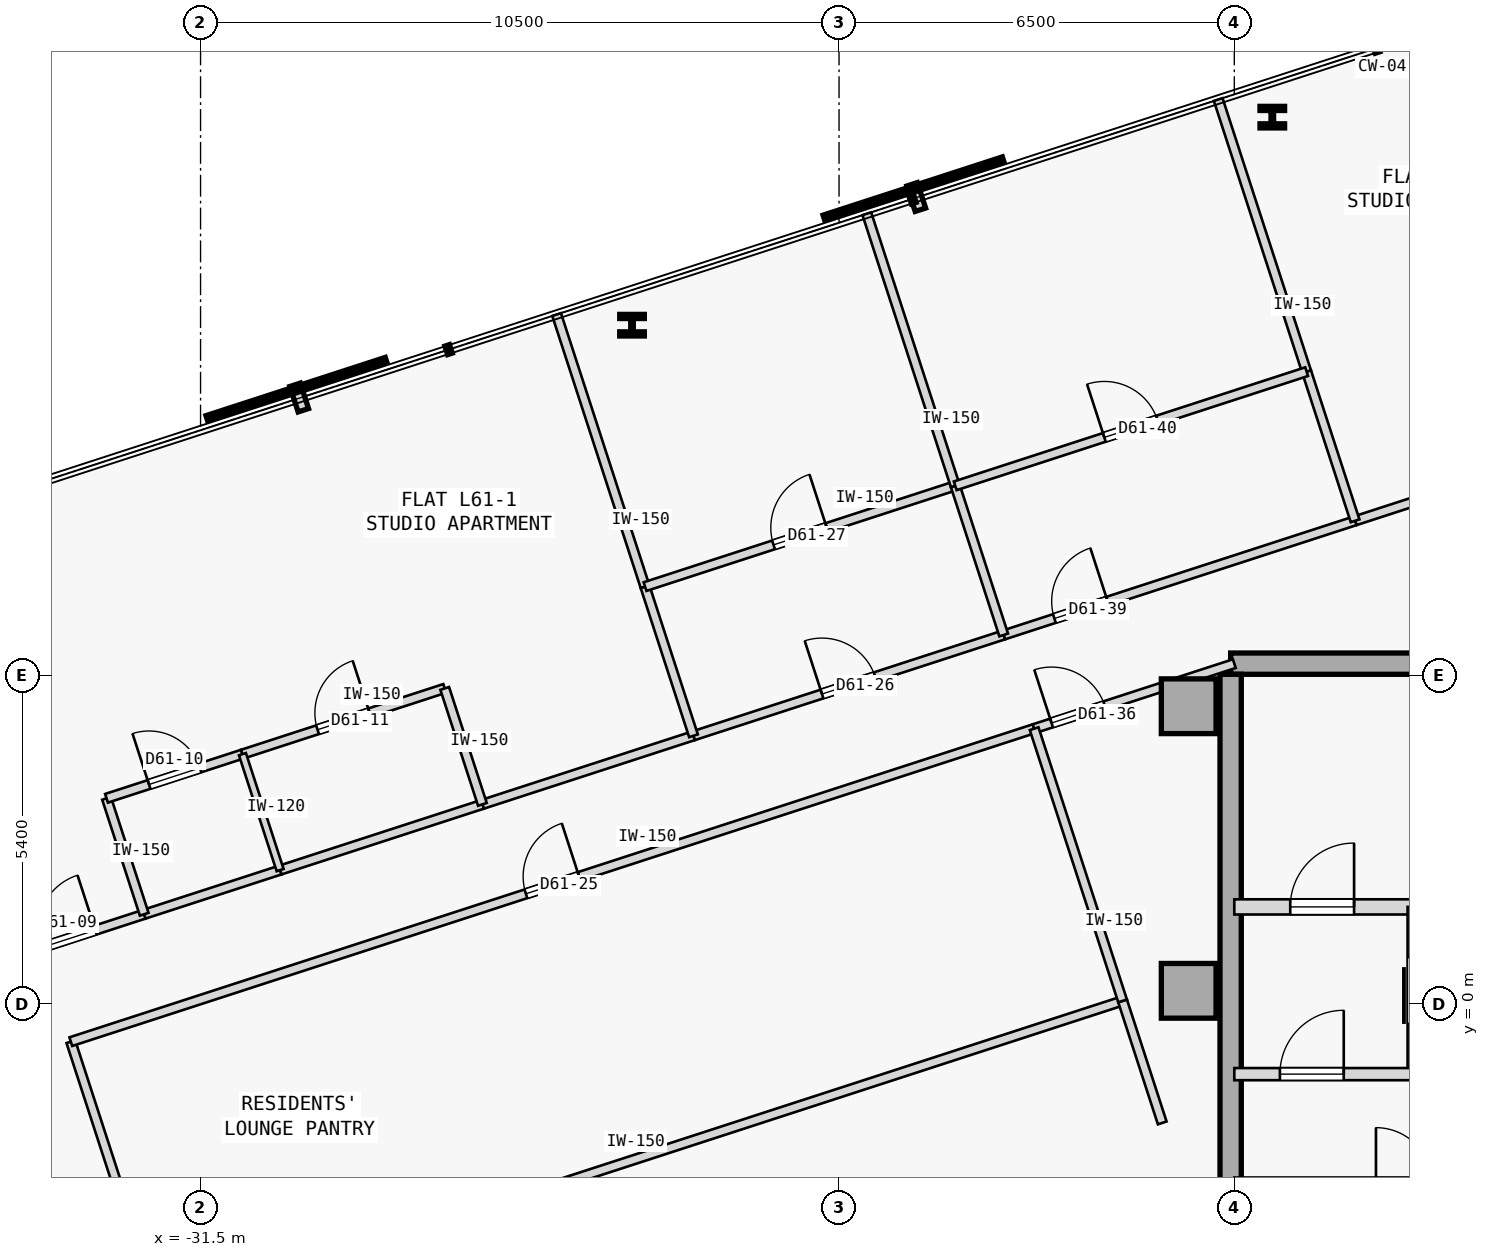
"""IFC4 building model, lengths in metres.
Left out: names, types, materials, properties, quantities, classifications, styles, units other than length and angle.
Written with IfcOpenShell. Run it as: python <this file> out.ifc"""

import sys

from ifc_helpers import new_model, si_unit, direction, frame, frame_2d, origin, origin_2d, place, context, subcontext, project, spatial, rectangle, i_section, extrude, element, fill, save


model = new_model("IFC4")
c1 = context("Model", 3, precision=1e-05, world=origin(), true_north=direction((0.0, 1.0)))
c2 = subcontext(c1, "Body", "Model", "MODEL_VIEW")
j1 = project(units=[si_unit("LENGTHUNIT", "METRE"), si_unit("PLANEANGLEUNIT", "RADIAN")], contexts=[c1])
p1 = place(None, origin())
s1 = spatial("IfcSite", under=j1, at=p1, CompositionType="ELEMENT")
p2 = place(p1, origin())
s2 = spatial("IfcBuilding", under=s1, at=p2, CompositionType="ELEMENT")
p3 = place(p2, frame((0.0, 0.0, 231.0)))
s3 = spatial("IfcBuildingStorey", under=s2, at=p3, CompositionType="ELEMENT", Elevation=231.0)
for number, where, z_axis, x_axis in (
    (1, (-15.25, 4.9, 0.0), (0.0, 0.0, 1.0), (1.0, 0.0, 0.0)),
    (2, (-15.25, 0.22, 0.0), (0.0, 0.0, 1.0), (1.0, 0.0, 0.0)),
):
    element("IfcColumn", number, at=place(p3, frame(where, z_axis=z_axis, x_axis=x_axis)), inside=s3, PredefinedType="COLUMN", context=c2, shape_type="SweptSolid", body=[
        extrude(rectangle(XDim=0.9, YDim=0.9, at=origin_2d()), origin(), (0.0, 0.0, 1.0), 3.35),
    ])
p4 = place(p3, frame((-14.56, 5.6, 0.0), z_axis=(0.0, 0.0, 1.0), x_axis=(1.0, 0.0, 0.0)))
e3 = element("IfcWall", 3, at=p4, inside=s3, PredefinedType="SHEAR", context=c2, shape_type="SweptSolid", body=[
    extrude(rectangle(XDim=11.41, YDim=0.35, at=frame_2d((5.705, 0.0))), origin(), (0.0, 0.0, 1.0), 3.125),
])
p5 = place(p3, frame((-14.56, -5.425, 0.0), z_axis=(0.0, 0.0, 1.0), x_axis=(0.0, 1.0, 0.0)))
e4 = element("IfcWall", 4, at=p5, inside=s3, PredefinedType="SHEAR", context=c2, shape_type="SweptSolid", body=[
    extrude(rectangle(XDim=10.85, YDim=0.35, at=frame_2d((5.425, 0.0))), origin(), (0.0, 0.0, 1.0), 3.125),
])
for number, where, z_axis, x_axis in (
    (5, (-13.875, 14.587, 0.0), (0.0, 0.0, 1.0), (1.0, 0.0, 0.0)),
    (6, (-24.404, 11.166, 0.0), (0.0, 0.0, 1.0), (1.0, 0.0, 0.0)),
):
    element("IfcColumn", number, at=place(p3, frame(where, z_axis=z_axis, x_axis=x_axis)), inside=s3, PredefinedType="COLUMN", context=c2, shape_type="SweptSolid", body=[
        extrude(i_section(OverallWidth=0.405, OverallDepth=0.355, WebThickness=0.042, FlangeThickness=0.068, FilletRadius=0.015, at=origin_2d()), origin(), (0.0, 0.0, 1.0), 3.35),
    ])
p6 = place(p3, frame((-14.5, 1.6, 0.0), z_axis=(0.0, 0.0, 1.0), x_axis=(1.0, 0.0, 0.0)))
e7 = element("IfcWall", 7, at=p6, inside=s3, PredefinedType="STANDARD", context=c2, shape_type="SweptSolid", body=[
    extrude(rectangle(XDim=3.6, YDim=0.25, at=frame_2d((1.8, 0.0))), origin(), (0.0, 0.0, 1.0), 3.125),
])
p7 = place(p6, frame((0.92, 0.0, 0.0)))
e8 = element("IfcOpeningElement", 8, at=p7, cuts=e7, PredefinedType="OPENING", context=c2, shape_type="SweptSolid", body=[
    extrude(rectangle(XDim=1.05, YDim=2.15, at=frame_2d((0.525, 1.075))), frame((0.0, 0.135, 0.0), z_axis=(0.0, -1.0, 0.0), x_axis=(1.0, 0.0, 0.0)), (0.0, 0.0, 1.0), 0.27),
])
p8 = place(p3, frame((-11.55, -1.15, 0.0), z_axis=(0.0, 0.0, 1.0), x_axis=(0.0, 1.0, 0.0)))
e9 = element("IfcWall", 9, at=p8, inside=s3, PredefinedType="STANDARD", context=c2, shape_type="SweptSolid", body=[
    extrude(rectangle(XDim=2.75, YDim=0.2, at=frame_2d((1.375, 0.0))), origin(), (0.0, 0.0, 1.0), 3.125),
])
p9 = place(p8, frame((0.825, 0.0, 0.0)))
e10 = element("IfcOpeningElement", 10, at=p9, cuts=e9, PredefinedType="OPENING", context=c2, shape_type="SweptSolid", body=[
    extrude(rectangle(XDim=1.1, YDim=2.15, at=frame_2d((0.55, 1.075))), frame((0.0, 0.11, 0.0), z_axis=(0.0, -1.0, 0.0), x_axis=(1.0, 0.0, 0.0)), (0.0, 0.0, 1.0), 0.22),
])
p10 = place(p3, frame((-14.5, -1.15, 0.0), z_axis=(0.0, 0.0, 1.0), x_axis=(1.0, 0.0, 0.0)))
e11 = element("IfcWall", 11, at=p10, inside=s3, PredefinedType="STANDARD", context=c2, shape_type="SweptSolid", body=[
    extrude(rectangle(XDim=2.95, YDim=0.2, at=frame_2d((1.475, 0.0))), origin(), (0.0, 0.0, 1.0), 3.125),
])
p11 = place(p10, frame((0.75, 0.0, 0.0)))
e12 = element("IfcOpeningElement", 12, at=p11, cuts=e11, PredefinedType="OPENING", context=c2, shape_type="SweptSolid", body=[
    extrude(rectangle(XDim=1.05, YDim=2.18, at=frame_2d((0.525, 1.09))), frame((0.0, 0.11, 0.0), z_axis=(0.0, -1.0, 0.0), x_axis=(1.0, 0.0, 0.0)), (0.0, 0.0, 1.0), 0.22),
])
p12 = place(p3, frame((-36.012, 0.314, 0.0), z_axis=(0.0, 0.0, 1.0), x_axis=(0.951071182868, 0.308971851659, 0.0)))
e13 = element("IfcWall", 13, at=p12, inside=s3, PredefinedType="PARTITIONING", context=c2, shape_type="SweptSolid", body=[
    extrude(rectangle(XDim=3.77, YDim=0.15, at=frame_2d((1.885, 0.0))), origin(), (0.0, 0.0, 1.0), 3.125),
])
p13 = place(p12, frame((1.976, 0.0, 0.0)))
e14 = element("IfcOpeningElement", 14, at=p13, cuts=e13, PredefinedType="OPENING", context=c2, shape_type="SweptSolid", body=[
    extrude(rectangle(XDim=0.95, YDim=2.15, at=frame_2d((0.475, 1.075))), frame((0.0, 0.085, 0.0), z_axis=(0.0, -1.0, 0.0), x_axis=(1.0, 0.0, 0.0)), (0.0, 0.0, 1.0), 0.17),
])
p14 = place(p3, frame((-26.865, 3.286, 0.0), z_axis=(0.0, 0.0, 1.0), x_axis=(0.951057168147, 0.309014988174, 0.0)))
e15 = element("IfcWall", 15, at=p14, inside=s3, PredefinedType="PARTITIONING", context=c2, shape_type="SweptSolid", body=[
    extrude(rectangle(XDim=3.65, YDim=0.15, at=frame_2d((1.825, 0.0))), origin(), (0.0, 0.0, 1.0), 3.125),
])
p15 = place(p3, frame((-32.427, 1.479, 0.0), z_axis=(0.0, 0.0, 1.0), x_axis=(0.951045519245, 0.309050837767, 0.0)))
e16 = element("IfcWall", 16, at=p15, inside=s3, PredefinedType="PARTITIONING", context=c2, shape_type="SweptSolid", body=[
    extrude(rectangle(XDim=2.35, YDim=0.15, at=frame_2d((1.175, 0.0))), origin(), (0.0, 0.0, 1.0), 3.125),
])
p16 = place(p3, frame((-30.192, 2.205, 0.0), z_axis=(0.0, 0.0, 1.0), x_axis=(0.951063814176, 0.308994532905, 0.0)))
e17 = element("IfcWall", 17, at=p16, inside=s3, PredefinedType="PARTITIONING", context=c2, shape_type="SweptSolid", body=[
    extrude(rectangle(XDim=3.498, YDim=0.15, at=frame_2d((1.749, 0.0))), origin(), (0.0, 0.0, 1.0), 3.125),
])
p17 = place(p3, frame((-12.513, 7.949, 0.0), z_axis=(0.0, 0.0, 1.0), x_axis=(0.951050780541, 0.309034646652, 0.0)))
e18 = element("IfcWall", 18, at=p17, inside=s3, PredefinedType="PARTITIONING", context=c2, shape_type="SweptSolid", body=[
    extrude(rectangle(XDim=3.65, YDim=0.15, at=frame_2d((1.825, 0.0))), origin(), (0.0, 0.0, 1.0), 3.125),
])
p18 = place(p3, frame((-32.179, -5.093, 0.0), z_axis=(0.0, 0.0, 1.0), x_axis=(-0.309014532869, 0.951057316083, 0.0)))
e19 = element("IfcWall", 19, at=p18, inside=s3, PredefinedType="PARTITIONING", context=c2, shape_type="SweptSolid", body=[
    extrude(rectangle(XDim=4.707, YDim=0.15, at=frame_2d((2.354, 0.0))), origin(), (0.0, 0.0, 1.0), 3.125),
])
p19 = place(p3, frame((-33.633, -0.616, 0.0), z_axis=(0.0, 0.0, 1.0), x_axis=(0.951058192995, 0.309011833974, 0.0)))
e20 = element("IfcWall", 20, at=p19, inside=s3, PredefinedType="PARTITIONING", context=c2, shape_type="SweptSolid", body=[
    extrude(rectangle(XDim=16.657, YDim=0.15, at=frame_2d((8.329, 0.0))), origin(), (0.0, 0.0, 1.0), 3.125),
])
p20 = place(p19, frame((7.868, 0.0, 0.0)))
e21 = element("IfcOpeningElement", 21, at=p20, cuts=e20, PredefinedType="OPENING", context=c2, shape_type="SweptSolid", body=[
    extrude(rectangle(XDim=0.92, YDim=2.15, at=frame_2d((0.46, 1.075))), frame((0.0, 0.085, 0.0), z_axis=(0.0, -1.0, 0.0), x_axis=(1.0, 0.0, 0.0)), (0.0, 0.0, 1.0), 0.17),
])
p21 = place(p3, frame((-23.394, 4.414, 0.0), z_axis=(0.0, 0.0, 1.0), x_axis=(0.951050121956, 0.309036673434, 0.0)))
e22 = element("IfcWall", 22, at=p21, inside=s3, PredefinedType="PARTITIONING", context=c2, shape_type="SweptSolid", body=[
    extrude(rectangle(XDim=5.364, YDim=0.15, at=frame_2d((2.682, 0.0))), origin(), (0.0, 0.0, 1.0), 3.125),
])
p22 = place(p21, frame((2.222, 0.0, 0.0)))
e23 = element("IfcOpeningElement", 23, at=p22, cuts=e22, PredefinedType="OPENING", context=c2, shape_type="SweptSolid", body=[
    extrude(rectangle(XDim=0.92, YDim=2.15, at=frame_2d((0.46, 1.075))), frame((0.0, 0.085, 0.0), z_axis=(0.0, -1.0, 0.0), x_axis=(1.0, 0.0, 0.0)), (0.0, 0.0, 1.0), 0.17),
])
p23 = place(p3, frame((-17.792, 4.531, 0.0), z_axis=(0.0, 0.0, 1.0), x_axis=(0.951047546178, 0.309044600193, 0.0)))
e24 = element("IfcWall", 24, at=p23, inside=s3, PredefinedType="PARTITIONING", context=c2, shape_type="SweptSolid", body=[
    extrude(rectangle(XDim=3.461, YDim=0.15, at=frame_2d((1.73, 0.0))), origin(), (0.0, 0.0, 1.0), 3.125),
])
p24 = place(p23, frame((0.302, 0.0, 0.0)))
e25 = element("IfcOpeningElement", 25, at=p24, cuts=e24, PredefinedType="OPENING", context=c2, shape_type="SweptSolid", body=[
    extrude(rectangle(XDim=0.92, YDim=2.15, at=frame_2d((0.46, 1.075))), frame((0.0, 0.085, 0.0), z_axis=(0.0, -1.0, 0.0), x_axis=(1.0, 0.0, 0.0)), (0.0, 0.0, 1.0), 0.17),
])
p25 = place(p3, frame((-18.292, 6.072, 0.0), z_axis=(0.0, 0.0, 1.0), x_axis=(0.951062707515, 0.30899793911, 0.0)))
e26 = element("IfcWall", 26, at=p25, inside=s3, PredefinedType="PARTITIONING", context=c2, shape_type="SweptSolid", body=[
    extrude(rectangle(XDim=6.076, YDim=0.15, at=frame_2d((3.038, 0.0))), origin(), (0.0, 0.0, 1.0), 3.125),
])
p26 = place(p25, frame((0.877, 0.0, 0.0)))
e27 = element("IfcOpeningElement", 27, at=p26, cuts=e26, PredefinedType="OPENING", context=c2, shape_type="SweptSolid", body=[
    extrude(rectangle(XDim=0.92, YDim=2.15, at=frame_2d((0.46, 1.075))), frame((0.0, 0.085, 0.0), z_axis=(0.0, -1.0, 0.0), x_axis=(1.0, 0.0, 0.0)), (0.0, 0.0, 1.0), 0.17),
])
p27 = place(p3, frame((-32.427, 1.479, 0.0), z_axis=(0.0, 0.0, 1.0), x_axis=(-0.309022749039, 0.951054646472, 0.0)))
e28 = element("IfcWall", 28, at=p27, inside=s3, PredefinedType="PARTITIONING", context=c2, shape_type="SweptSolid", body=[
    extrude(rectangle(XDim=2.005, YDim=0.15, at=frame_2d((1.002, 0.0))), origin(), (0.0, 0.0, 1.0), 3.125),
])
p28 = place(p3, frame((-33.046, 3.386, 0.0), z_axis=(0.0, 0.0, 1.0), x_axis=(0.951045519245, 0.309050837767, 0.0)))
e29 = element("IfcWall", 29, at=p28, inside=s3, PredefinedType="PARTITIONING", context=c2, shape_type="SweptSolid", body=[
    extrude(rectangle(XDim=2.35, YDim=0.15, at=frame_2d((1.175, 0.0))), origin(), (0.0, 0.0, 1.0), 3.125),
])
p29 = place(p28, frame((0.735, 0.0, 0.0)))
e30 = element("IfcOpeningElement", 30, at=p29, cuts=e29, PredefinedType="OPENING", context=c2, shape_type="SweptSolid", body=[
    extrude(rectangle(XDim=0.88, YDim=2.15, at=frame_2d((0.44, 1.075))), frame((0.0, 0.085, 0.0), z_axis=(0.0, -1.0, 0.0), x_axis=(1.0, 0.0, 0.0)), (0.0, 0.0, 1.0), 0.17),
])
p30 = place(p3, frame((-30.811, 4.112, 0.0), z_axis=(0.0, 0.0, 1.0), x_axis=(0.951063814176, 0.308994532905, 0.0)))
e31 = element("IfcWall", 31, at=p30, inside=s3, PredefinedType="PARTITIONING", context=c2, shape_type="SweptSolid", body=[
    extrude(rectangle(XDim=3.498, YDim=0.15, at=frame_2d((1.749, 0.0))), origin(), (0.0, 0.0, 1.0), 3.125),
])
p31 = place(p30, frame((1.299, 0.0, 0.0)))
e32 = element("IfcOpeningElement", 32, at=p31, cuts=e31, PredefinedType="OPENING", context=c2, shape_type="SweptSolid", body=[
    extrude(rectangle(XDim=0.9, YDim=2.15, at=frame_2d((0.45, 1.075))), frame((0.0, 0.085, 0.0), z_axis=(0.0, -1.0, 0.0), x_axis=(1.0, 0.0, 0.0)), (0.0, 0.0, 1.0), 0.17),
])
p32 = place(p3, frame((-26.865, 3.286, 0.0), z_axis=(0.0, 0.0, 1.0), x_axis=(-0.309022749039, 0.951054646472, 0.0)))
e33 = element("IfcWall", 33, at=p32, inside=s3, PredefinedType="PARTITIONING", context=c2, shape_type="SweptSolid", body=[
    extrude(rectangle(XDim=2.005, YDim=0.15, at=frame_2d((1.002, 0.0))), origin(), (0.0, 0.0, 1.0), 3.125),
])
p33 = place(p3, frame((-23.394, 4.414, 0.0), z_axis=(0.0, 0.0, 1.0), x_axis=(-0.308976906612, 0.951069540665, 0.0)))
e34 = element("IfcWall", 34, at=p33, inside=s3, PredefinedType="PARTITIONING", context=c2, shape_type="SweptSolid", body=[
    extrude(rectangle(XDim=2.579, YDim=0.15, at=frame_2d((1.29, 0.0))), origin(), (0.0, 0.0, 1.0), 3.125),
])
p34 = place(p3, frame((-24.19, 6.867, 0.0), z_axis=(0.0, 0.0, 1.0), x_axis=(-0.309057912466, 0.951043220228, 0.0)))
e35 = element("IfcWall", 35, at=p34, inside=s3, PredefinedType="PARTITIONING", context=c2, shape_type="SweptSolid", body=[
    extrude(rectangle(XDim=4.705, YDim=0.15, at=frame_2d((2.353, 0.0))), origin(), (0.0, 0.0, 1.0), 3.125),
])
p35 = place(p3, frame((-30.192, 2.205, 0.0), z_axis=(0.0, 0.0, 1.0), x_axis=(-0.309022749039, 0.951054646472, 0.0)))
e36 = element("IfcWall", 36, at=p35, inside=s3, PredefinedType="PARTITIONING", context=c2, shape_type="SweptSolid", body=[
    extrude(rectangle(XDim=2.005, YDim=0.12, at=frame_2d((1.002, 0.0))), origin(), (0.0, 0.0, 1.0), 3.125),
])
p36 = place(p3, frame((-12.513, 7.949, 0.0), z_axis=(0.0, 0.0, 1.0), x_axis=(-0.309062527822, 0.951041720376, 0.0)))
e37 = element("IfcWall", 37, at=p36, inside=s3, PredefinedType="PARTITIONING", context=c2, shape_type="SweptSolid", body=[
    extrude(rectangle(XDim=2.579, YDim=0.15, at=frame_2d((1.29, 0.0))), origin(), (0.0, 0.0, 1.0), 3.125),
])
p37 = place(p3, frame((-13.311, 10.402, 0.0), z_axis=(0.0, 0.0, 1.0), x_axis=(-0.309010977541, 0.951058471262, 0.0)))
e38 = element("IfcWall", 38, at=p37, inside=s3, PredefinedType="PARTITIONING", context=c2, shape_type="SweptSolid", body=[
    extrude(rectangle(XDim=4.705, YDim=0.15, at=frame_2d((2.353, 0.0))), origin(), (0.0, 0.0, 1.0), 3.125),
])
p38 = place(p3, frame((-32.179, -5.093, 0.0), z_axis=(0.0, 0.0, 1.0), x_axis=(0.951053885426, 0.309025091239, 0.0)))
e39 = element("IfcWall", 39, at=p38, inside=s3, PredefinedType="PARTITIONING", context=c2, shape_type="SweptSolid", body=[
    extrude(rectangle(XDim=16.657, YDim=0.15, at=frame_2d((8.329, 0.0))), origin(), (0.0, 0.0, 1.0), 3.125),
])
p39 = place(p3, frame((-15.685, -1.952, 0.0), z_axis=(0.0, 0.0, 1.0), x_axis=(-0.308929092959, 0.951085072706, 0.0)))
e40 = element("IfcWall", 40, at=p39, inside=s3, PredefinedType="PARTITIONING", context=c2, shape_type="SweptSolid", body=[
    extrude(rectangle(XDim=2.11, YDim=0.15, at=frame_2d((1.055, 0.0))), origin(), (0.0, 0.0, 1.0), 3.125),
])
p40 = place(p3, frame((-16.337, 0.054, 0.0), z_axis=(0.0, 0.0, 1.0), x_axis=(-0.309029776355, 0.951052363083, 0.0)))
e41 = element("IfcWall", 41, at=p40, inside=s3, PredefinedType="PARTITIONING", context=c2, shape_type="SweptSolid", body=[
    extrude(rectangle(XDim=4.707, YDim=0.15, at=frame_2d((2.354, 0.0))), origin(), (0.0, 0.0, 1.0), 3.125),
])
p41 = place(p3, frame((-24.19, 6.867, 0.0), z_axis=(0.0, 0.0, 1.0), x_axis=(0.951059152206, 0.309008881758, 0.0)))
e42 = element("IfcWall", 42, at=p41, inside=s3, PredefinedType="PARTITIONING", context=c2, shape_type="SweptSolid", body=[
    extrude(rectangle(XDim=5.364, YDim=0.15, at=frame_2d((2.682, 0.0))), origin(), (0.0, 0.0, 1.0), 3.125),
])
p42 = place(p41, frame((2.222, 0.0, 0.0)))
e43 = element("IfcOpeningElement", 43, at=p42, cuts=e42, PredefinedType="OPENING", context=c2, shape_type="SweptSolid", body=[
    extrude(rectangle(XDim=0.92, YDim=2.15, at=frame_2d((0.46, 1.075))), frame((0.0, 0.085, 0.0), z_axis=(0.0, -1.0, 0.0), x_axis=(1.0, 0.0, 0.0)), (0.0, 0.0, 1.0), 0.17),
])
p43 = place(p3, frame((-18.292, 6.072, 0.0), z_axis=(0.0, 0.0, 1.0), x_axis=(-0.309090353524, 0.951032677335, 0.0)))
e44 = element("IfcWall", 44, at=p43, inside=s3, PredefinedType="PARTITIONING", context=c2, shape_type="SweptSolid", body=[
    extrude(rectangle(XDim=2.579, YDim=0.15, at=frame_2d((1.29, 0.0))), origin(), (0.0, 0.0, 1.0), 3.125),
])
p44 = place(p3, frame((-19.089, 8.524, 0.0), z_axis=(0.0, 0.0, 1.0), x_axis=(-0.308995728133, 0.951063425853, 0.0)))
e45 = element("IfcWall", 45, at=p44, inside=s3, PredefinedType="PARTITIONING", context=c2, shape_type="SweptSolid", body=[
    extrude(rectangle(XDim=4.705, YDim=0.15, at=frame_2d((2.353, 0.0))), origin(), (0.0, 0.0, 1.0), 3.125),
])
p45 = place(p3, frame((-19.089, 8.524, 0.0), z_axis=(0.0, 0.0, 1.0), x_axis=(0.951050898488, 0.309034283674, 0.0)))
e46 = element("IfcWall", 46, at=p45, inside=s3, PredefinedType="PARTITIONING", context=c2, shape_type="SweptSolid", body=[
    extrude(rectangle(XDim=6.076, YDim=0.15, at=frame_2d((3.038, 0.0))), origin(), (0.0, 0.0, 1.0), 3.125),
])
p46 = place(p45, frame((2.578, 0.0, 0.0)))
e47 = element("IfcOpeningElement", 47, at=p46, cuts=e46, PredefinedType="OPENING", context=c2, shape_type="SweptSolid", body=[
    extrude(rectangle(XDim=0.92, YDim=2.15, at=frame_2d((0.46, 1.075))), frame((0.0, 0.085, 0.0), z_axis=(0.0, -1.0, 0.0), x_axis=(1.0, 0.0, 0.0)), (0.0, 0.0, 1.0), 0.17),
])
p47 = place(p7, origin())
e48 = element("IfcDoor", 48, at=p47, inside=s3, OperationType="SINGLE_SWING_RIGHT", PredefinedType="DOOR", context=c2, shape_type="SweptSolid", body=[
    extrude(rectangle(XDim=1.05, YDim=2.15, at=frame_2d((0.525, 1.075))), frame((0.0, 0.025, 0.0), z_axis=(0.0, -1.0, 0.0), x_axis=(1.0, 0.0, 0.0)), (0.0, 0.0, 1.0), 0.05),
])
fill(e8, e48)
p48 = place(p11, origin())
e49 = element("IfcDoor", 49, at=p48, inside=s3, OperationType="SINGLE_SWING_RIGHT", PredefinedType="DOOR", context=c2, shape_type="SweptSolid", body=[
    extrude(rectangle(XDim=1.05, YDim=2.18, at=frame_2d((0.525, 1.09))), frame((0.0, 0.025, 0.0), z_axis=(0.0, -1.0, 0.0), x_axis=(1.0, 0.0, 0.0)), (0.0, 0.0, 1.0), 0.05),
])
fill(e12, e49)
p49 = place(p13, origin())
e50 = element("IfcDoor", 50, at=p49, inside=s3, OperationType="SINGLE_SWING_RIGHT", PredefinedType="DOOR", context=c2, shape_type="SweptSolid", body=[
    extrude(rectangle(XDim=0.95, YDim=2.15, at=frame_2d((0.475, 1.075))), frame((0.0, 0.025, 0.0), z_axis=(0.0, -1.0, 0.0), x_axis=(1.0, 0.0, 0.0)), (0.0, 0.0, 1.0), 0.05),
])
fill(e14, e50)
p50 = place(p29, origin())
e51 = element("IfcDoor", 51, at=p50, inside=s3, OperationType="SINGLE_SWING_LEFT", PredefinedType="DOOR", context=c2, shape_type="SweptSolid", body=[
    extrude(rectangle(XDim=0.88, YDim=2.15, at=frame_2d((0.44, 1.075))), frame((0.0, 0.025, 0.0), z_axis=(0.0, -1.0, 0.0), x_axis=(1.0, 0.0, 0.0)), (0.0, 0.0, 1.0), 0.05),
])
fill(e30, e51)
p51 = place(p31, origin())
e52 = element("IfcDoor", 52, at=p51, inside=s3, OperationType="SINGLE_SWING_RIGHT", PredefinedType="DOOR", context=c2, shape_type="SweptSolid", body=[
    extrude(rectangle(XDim=0.9, YDim=2.15, at=frame_2d((0.45, 1.075))), frame((0.0, 0.025, 0.0), z_axis=(0.0, -1.0, 0.0), x_axis=(1.0, 0.0, 0.0)), (0.0, 0.0, 1.0), 0.05),
])
fill(e32, e52)
p52 = place(p20, origin())
e53 = element("IfcDoor", 53, at=p52, inside=s3, OperationType="SINGLE_SWING_RIGHT", PredefinedType="DOOR", context=c2, shape_type="SweptSolid", body=[
    extrude(rectangle(XDim=0.92, YDim=2.15, at=frame_2d((0.46, 1.075))), frame((0.0, 0.025, 0.0), z_axis=(0.0, -1.0, 0.0), x_axis=(1.0, 0.0, 0.0)), (0.0, 0.0, 1.0), 0.05),
])
fill(e21, e53)
p53 = place(p22, origin())
e54 = element("IfcDoor", 54, at=p53, inside=s3, OperationType="SINGLE_SWING_LEFT", PredefinedType="DOOR", context=c2, shape_type="SweptSolid", body=[
    extrude(rectangle(XDim=0.92, YDim=2.15, at=frame_2d((0.46, 1.075))), frame((0.0, 0.025, 0.0), z_axis=(0.0, -1.0, 0.0), x_axis=(1.0, 0.0, 0.0)), (0.0, 0.0, 1.0), 0.05),
])
fill(e23, e54)
p54 = place(p42, origin())
e55 = element("IfcDoor", 55, at=p54, inside=s3, OperationType="SINGLE_SWING_RIGHT", PredefinedType="DOOR", context=c2, shape_type="SweptSolid", body=[
    extrude(rectangle(XDim=0.92, YDim=2.15, at=frame_2d((0.46, 1.075))), frame((0.0, 0.025, 0.0), z_axis=(0.0, -1.0, 0.0), x_axis=(1.0, 0.0, 0.0)), (0.0, 0.0, 1.0), 0.05),
])
fill(e43, e55)
p55 = place(p24, origin())
e56 = element("IfcDoor", 56, at=p55, inside=s3, OperationType="SINGLE_SWING_LEFT", PredefinedType="DOOR", context=c2, shape_type="SweptSolid", body=[
    extrude(rectangle(XDim=0.92, YDim=2.15, at=frame_2d((0.46, 1.075))), frame((0.0, 0.025, 0.0), z_axis=(0.0, -1.0, 0.0), x_axis=(1.0, 0.0, 0.0)), (0.0, 0.0, 1.0), 0.05),
])
fill(e25, e56)
p56 = place(p26, origin())
e57 = element("IfcDoor", 57, at=p56, inside=s3, OperationType="SINGLE_SWING_RIGHT", PredefinedType="DOOR", context=c2, shape_type="SweptSolid", body=[
    extrude(rectangle(XDim=0.92, YDim=2.15, at=frame_2d((0.46, 1.075))), frame((0.0, 0.025, 0.0), z_axis=(0.0, -1.0, 0.0), x_axis=(1.0, 0.0, 0.0)), (0.0, 0.0, 1.0), 0.05),
])
fill(e27, e57)
p57 = place(p46, origin())
e58 = element("IfcDoor", 58, at=p57, inside=s3, OperationType="SINGLE_SWING_LEFT", PredefinedType="DOOR", context=c2, shape_type="SweptSolid", body=[
    extrude(rectangle(XDim=0.92, YDim=2.15, at=frame_2d((0.46, 1.075))), frame((0.0, 0.025, 0.0), z_axis=(0.0, -1.0, 0.0), x_axis=(1.0, 0.0, 0.0)), (0.0, 0.0, 1.0), 0.05),
])
fill(e47, e58)
save(model, sys.argv[1])
